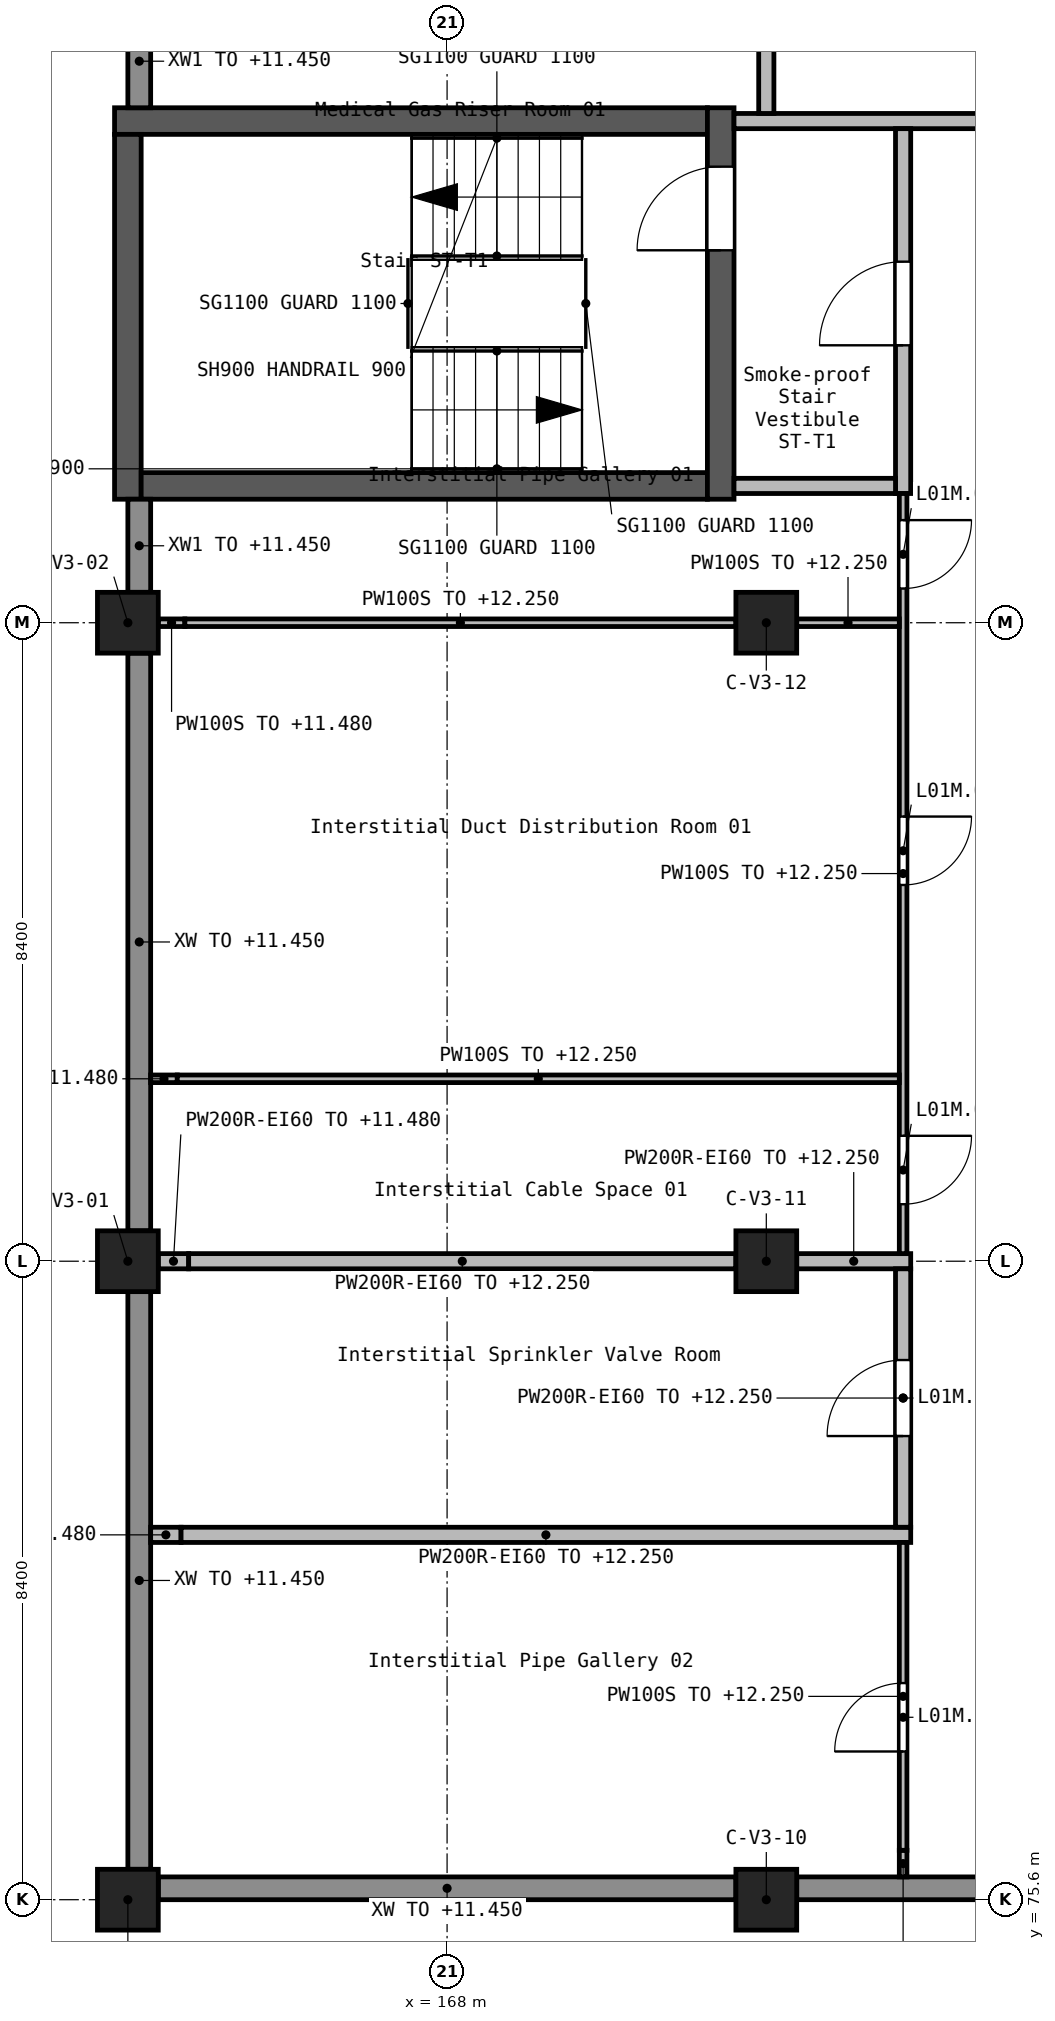
"""IFC4 building model, lengths in metres.
Left out: names, types, materials, properties, quantities, classifications, styles, units other than length and angle.
Written with IfcOpenShell. Run it as: python <this file> out.ifc"""

import sys

from ifc_helpers import new_model, si_unit, direction, frame, frame_2d, origin, origin_2d, place, context, subcontext, project, spatial, rectangle, extrude, element, fill, save


model = new_model("IFC4")
c1 = context("Model", 3, precision=1e-05, world=origin(), true_north=direction((0.0, 1.0)))
c2 = subcontext(c1, "Body", "Model", "MODEL_VIEW")
j1 = project(units=[si_unit("LENGTHUNIT", "METRE"), si_unit("PLANEANGLEUNIT", "RADIAN")], contexts=[c1])
p1 = place(None, origin())
s1 = spatial("IfcSite", under=j1, at=p1, CompositionType="ELEMENT")
p2 = place(p1, origin())
s2 = spatial("IfcBuilding", under=s1, at=p2, CompositionType="ELEMENT")
p3 = place(p2, frame((0.0, 0.0, 9.9)))
s3 = spatial("IfcBuildingStorey", under=s2, at=p3, CompositionType="ELEMENT", Elevation=9.9)
for number, where, z_axis, x_axis in (
    (1, (163.8, 75.6, 0.0), (0.0, 0.0, 1.0), (1.0, 0.0, 0.0)),
    (2, (163.8, 84.0, 0.0), (0.0, 0.0, 1.0), (1.0, 0.0, 0.0)),
    (3, (163.8, 92.4, 0.0), (0.0, 0.0, 1.0), (1.0, 0.0, 0.0)),
    (4, (172.2, 75.6, 0.0), (0.0, 0.0, 1.0), (1.0, 0.0, 0.0)),
    (5, (172.2, 84.0, 0.0), (0.0, 0.0, 1.0), (1.0, 0.0, 0.0)),
    (6, (172.2, 92.4, 0.0), (0.0, 0.0, 1.0), (1.0, 0.0, 0.0)),
):
    element("IfcColumn", number, at=place(p3, frame(where, z_axis=z_axis, x_axis=x_axis)), inside=s3, PredefinedType="COLUMN", context=c2, shape_type="SweptSolid", body=[
        extrude(rectangle(XDim=0.8, YDim=0.8, at=origin_2d()), origin(), (0.0, 0.0, 1.0), 2.7),
    ])
p4 = place(p3, frame((163.625, 99.0, 0.0), z_axis=(0.0, 0.0, 1.0), x_axis=(1.0, 0.0, 0.0)))
e7 = element("IfcWall", 7, at=p4, inside=s3, PredefinedType="SHEAR", context=c2, shape_type="SweptSolid", body=[
    extrude(rectangle(XDim=7.8, YDim=0.35, at=frame_2d((3.9, 0.0))), origin(), (0.0, 0.0, 1.0), 2.7),
])
p5 = place(p3, frame((163.8, 94.025, 0.0), z_axis=(0.0, 0.0, 1.0), x_axis=(0.0, 1.0, 0.0)))
e8 = element("IfcWall", 8, at=p5, inside=s3, PredefinedType="SHEAR", context=c2, shape_type="SweptSolid", body=[
    extrude(rectangle(XDim=4.8, YDim=0.35, at=frame_2d((2.4, 0.0))), origin(), (0.0, 0.0, 1.0), 2.7),
])
p6 = place(p3, frame((163.975, 94.2, 0.0), z_axis=(0.0, 0.0, 1.0), x_axis=(1.0, 0.0, 0.0)))
e9 = element("IfcWall", 9, at=p6, inside=s3, PredefinedType="SHEAR", context=c2, shape_type="SweptSolid", body=[
    extrude(rectangle(XDim=7.45, YDim=0.35, at=frame_2d((3.725, 0.0))), origin(), (0.0, 0.0, 1.0), 2.7),
])
p7 = place(p3, frame((171.6, 94.025, 0.0), z_axis=(0.0, 0.0, 1.0), x_axis=(0.0, 1.0, 0.0)))
e10 = element("IfcWall", 10, at=p7, inside=s3, PredefinedType="SHEAR", context=c2, shape_type="SweptSolid", body=[
    extrude(rectangle(XDim=5.15, YDim=0.35, at=frame_2d((2.575, 0.0))), origin(), (0.0, 0.0, 1.0), 2.7),
])
p8 = place(p7, frame((3.275, 0.0, 0.0)))
e11 = element("IfcOpeningElement", 11, at=p8, cuts=e10, PredefinedType="OPENING", context=c2, shape_type="SweptSolid", body=[
    extrude(rectangle(XDim=1.1, YDim=2.1, at=frame_2d((0.55, 1.05))), frame((0.0, 0.185, 0.0), z_axis=(0.0, -1.0, 0.0), x_axis=(1.0, 0.0, 0.0)), (0.0, 0.0, 1.0), 0.37),
])
for number, where, z_axis, x_axis in (
    (12, (163.95, 100.4, 0.0), (0.0, 0.0, 1.0), (0.0, -1.0, 0.0)),
    (13, (163.95, 94.025, 0.0), (0.0, 0.0, 1.0), (0.0, -1.0, 0.0)),
):
    element("IfcWall", number, at=place(p3, frame(where, z_axis=z_axis, x_axis=x_axis)), inside=s3, PredefinedType="STANDARD", context=c2, shape_type="SweptSolid", body=[
        extrude(rectangle(XDim=1.225, YDim=0.3, at=frame_2d((0.612, 0.0))), origin(), (0.0, 0.0, 1.0), 1.55),
    ])
for number, where, z_axis, x_axis in (
    (14, (163.95, 92.0, 0.0), (0.0, 0.0, 1.0), (0.0, -1.0, 0.0)),
    (15, (163.95, 83.6, 0.0), (0.0, 0.0, 1.0), (0.0, -1.0, 0.0)),
    (16, (164.2, 75.75, 0.0), (0.0, 0.0, 1.0), (1.0, 0.0, 0.0)),
):
    element("IfcWall", number, at=place(p3, frame(where, z_axis=z_axis, x_axis=x_axis)), inside=s3, PredefinedType="STANDARD", context=c2, shape_type="SweptSolid", body=[
        extrude(rectangle(XDim=7.6, YDim=0.3, at=frame_2d((3.8, 0.0))), origin(), (0.0, 0.0, 1.0), 1.55),
    ])
p9 = place(p3, frame((172.6, 75.75, 0.0), z_axis=(0.0, 0.0, 1.0), x_axis=(1.0, 0.0, 0.0)))
e17 = element("IfcWall", 17, at=p9, inside=s3, PredefinedType="STANDARD", context=c2, shape_type="SweptSolid", body=[
    extrude(rectangle(XDim=7.6, YDim=0.3, at=frame_2d((3.8, 0.0))), origin(), (0.0, 0.0, 1.0), 1.55),
])
p10 = place(p3, frame((180.7, 99.0, 0.0), z_axis=(0.0, 0.0, 1.0), x_axis=(-1.0, 0.0, 0.0)))
e18 = element("IfcWall", 18, at=p10, inside=s3, PredefinedType="SOLIDWALL", context=c2, shape_type="SweptSolid", body=[
    extrude(rectangle(XDim=8.925, YDim=0.2, at=frame_2d((4.462, 0.0))), origin(), (0.0, 0.0, 1.0), 2.35),
])
p11 = place(p10, frame((2.5, 0.0, 0.0)))
e19 = element("IfcOpeningElement", 19, at=p11, cuts=e18, PredefinedType="OPENING", context=c2, shape_type="SweptSolid", body=[
    extrude(rectangle(XDim=1.8, YDim=2.1, at=frame_2d((0.9, 1.05))), frame((0.0, 0.11, 0.0), z_axis=(0.0, -1.0, 0.0), x_axis=(1.0, 0.0, 0.0)), (0.0, 0.0, 1.0), 0.22),
])
p12 = place(p3, frame((164.1, 80.4, 0.0), z_axis=(0.0, 0.0, 1.0), x_axis=(1.0, 0.0, 0.0)))
e20 = element("IfcWall", 20, at=p12, inside=s3, PredefinedType="SOLIDWALL", context=c2, shape_type="SweptSolid", body=[
    extrude(rectangle(XDim=0.4, YDim=0.2, at=frame_2d((0.2, 0.0))), origin(), (0.0, 0.0, 1.0), 1.58),
])
p13 = place(p3, frame((164.5, 80.4, 0.0), z_axis=(0.0, 0.0, 1.0), x_axis=(1.0, 0.0, 0.0)))
e21 = element("IfcWall", 21, at=p13, inside=s3, PredefinedType="SOLIDWALL", context=c2, shape_type="SweptSolid", body=[
    extrude(rectangle(XDim=9.6, YDim=0.2, at=frame_2d((4.8, 0.0))), origin(), (0.0, 0.0, 1.0), 2.35),
])
p14 = place(p3, frame((164.2, 84.0, 0.0), z_axis=(0.0, 0.0, 1.0), x_axis=(1.0, 0.0, 0.0)))
e22 = element("IfcWall", 22, at=p14, inside=s3, PredefinedType="SOLIDWALL", context=c2, shape_type="SweptSolid", body=[
    extrude(rectangle(XDim=0.4, YDim=0.2, at=frame_2d((0.2, 0.0))), origin(), (0.0, 0.0, 1.0), 1.58),
])
p15 = place(p3, frame((164.6, 84.0, 0.0), z_axis=(0.0, 0.0, 1.0), x_axis=(1.0, 0.0, 0.0)))
e23 = element("IfcWall", 23, at=p15, inside=s3, PredefinedType="SOLIDWALL", context=c2, shape_type="SweptSolid", body=[
    extrude(rectangle(XDim=7.2, YDim=0.2, at=frame_2d((3.6, 0.0))), origin(), (0.0, 0.0, 1.0), 2.35),
])
p16 = place(p3, frame((172.6, 84.0, 0.0), z_axis=(0.0, 0.0, 1.0), x_axis=(1.0, 0.0, 0.0)))
e24 = element("IfcWall", 24, at=p16, inside=s3, PredefinedType="SOLIDWALL", context=c2, shape_type="SweptSolid", body=[
    extrude(rectangle(XDim=1.5, YDim=0.2, at=frame_2d((0.75, 0.0))), origin(), (0.0, 0.0, 1.0), 2.35),
])
p17 = place(p3, frame((172.2, 100.4, 0.0), z_axis=(0.0, 0.0, 1.0), x_axis=(0.0, -1.0, 0.0)))
e25 = element("IfcWall", 25, at=p17, inside=s3, PredefinedType="SOLIDWALL", context=c2, shape_type="SweptSolid", body=[
    extrude(rectangle(XDim=1.3, YDim=0.2, at=frame_2d((0.65, 0.0))), origin(), (0.0, 0.0, 1.0), 2.35),
])
p18 = place(p3, frame((174.0, 94.1, 0.0), z_axis=(0.0, 0.0, 1.0), x_axis=(0.0, 1.0, 0.0)))
e26 = element("IfcWall", 26, at=p18, inside=s3, PredefinedType="SOLIDWALL", context=c2, shape_type="SweptSolid", body=[
    extrude(rectangle(XDim=4.8, YDim=0.2, at=frame_2d((2.4, 0.0))), origin(), (0.0, 0.0, 1.0), 2.35),
])
p19 = place(p18, frame((1.95, 0.0, 0.0)))
e27 = element("IfcOpeningElement", 27, at=p19, cuts=e26, PredefinedType="OPENING", context=c2, shape_type="SweptSolid", body=[
    extrude(rectangle(XDim=1.1, YDim=2.1, at=frame_2d((0.55, 1.05))), frame((0.0, 0.11, 0.0), z_axis=(0.0, -1.0, 0.0), x_axis=(1.0, 0.0, 0.0)), (0.0, 0.0, 1.0), 0.22),
])
p20 = place(p3, frame((174.0, 80.5, 0.0), z_axis=(0.0, 0.0, 1.0), x_axis=(0.0, 1.0, 0.0)))
e28 = element("IfcWall", 28, at=p20, inside=s3, PredefinedType="SOLIDWALL", context=c2, shape_type="SweptSolid", body=[
    extrude(rectangle(XDim=3.4, YDim=0.2, at=frame_2d((1.7, 0.0))), origin(), (0.0, 0.0, 1.0), 2.35),
])
p21 = place(p20, frame((1.2, 0.0, 0.0)))
e29 = element("IfcOpeningElement", 29, at=p21, cuts=e28, PredefinedType="OPENING", context=c2, shape_type="SweptSolid", body=[
    extrude(rectangle(XDim=1.0, YDim=2.1, at=frame_2d((0.5, 1.05))), frame((0.0, 0.11, 0.0), z_axis=(0.0, -1.0, 0.0), x_axis=(1.0, 0.0, 0.0)), (0.0, 0.0, 1.0), 0.22),
])
p22 = place(p3, frame((171.775, 94.2, 0.0), z_axis=(0.0, 0.0, 1.0), x_axis=(1.0, 0.0, 0.0)))
e30 = element("IfcWall", 30, at=p22, inside=s3, PredefinedType="SOLIDWALL", context=c2, shape_type="SweptSolid", body=[
    extrude(rectangle(XDim=2.125, YDim=0.2, at=frame_2d((1.062, 0.0))), origin(), (0.0, 0.0, 1.0), 2.35),
])
p23 = place(p3, frame((174.0, 94.1, 0.0), z_axis=(0.0, 0.0, 1.0), x_axis=(0.0, -1.0, 0.0)))
e31 = element("IfcWall", 31, at=p23, inside=s3, PredefinedType="PARTITIONING", context=c2, shape_type="SweptSolid", body=[
    extrude(rectangle(XDim=10.0, YDim=0.1, at=frame_2d((5.0, 0.0))), origin(), (0.0, 0.0, 1.0), 2.35),
])
p24 = place(p23, frame((0.35, 0.0, 0.0)))
e32 = element("IfcOpeningElement", 32, at=p24, cuts=e31, PredefinedType="OPENING", context=c2, shape_type="SweptSolid", body=[
    extrude(rectangle(XDim=0.9, YDim=2.1, at=frame_2d((0.45, 1.05))), frame((0.0, 0.06, 0.0), z_axis=(0.0, -1.0, 0.0), x_axis=(1.0, 0.0, 0.0)), (0.0, 0.0, 1.0), 0.12),
])
p25 = place(p23, frame((4.25, 0.0, 0.0)))
e33 = element("IfcOpeningElement", 33, at=p25, cuts=e31, PredefinedType="OPENING", context=c2, shape_type="SweptSolid", body=[
    extrude(rectangle(XDim=0.9, YDim=2.1, at=frame_2d((0.45, 1.05))), frame((0.0, 0.06, 0.0), z_axis=(0.0, -1.0, 0.0), x_axis=(1.0, 0.0, 0.0)), (0.0, 0.0, 1.0), 0.12),
])
p26 = place(p23, frame((8.45, 0.0, 0.0)))
e34 = element("IfcOpeningElement", 34, at=p26, cuts=e31, PredefinedType="OPENING", context=c2, shape_type="SweptSolid", body=[
    extrude(rectangle(XDim=0.9, YDim=2.1, at=frame_2d((0.45, 1.05))), frame((0.0, 0.06, 0.0), z_axis=(0.0, -1.0, 0.0), x_axis=(1.0, 0.0, 0.0)), (0.0, 0.0, 1.0), 0.12),
])
p27 = place(p3, frame((164.1, 86.4, 0.0), z_axis=(0.0, 0.0, 1.0), x_axis=(1.0, 0.0, 0.0)))
e35 = element("IfcWall", 35, at=p27, inside=s3, PredefinedType="PARTITIONING", context=c2, shape_type="SweptSolid", body=[
    extrude(rectangle(XDim=0.35, YDim=0.1, at=frame_2d((0.175, 0.0))), origin(), (0.0, 0.0, 1.0), 1.58),
])
p28 = place(p3, frame((164.45, 86.4, 0.0), z_axis=(0.0, 0.0, 1.0), x_axis=(1.0, 0.0, 0.0)))
e36 = element("IfcWall", 36, at=p28, inside=s3, PredefinedType="PARTITIONING", context=c2, shape_type="SweptSolid", body=[
    extrude(rectangle(XDim=9.5, YDim=0.1, at=frame_2d((4.75, 0.0))), origin(), (0.0, 0.0, 1.0), 2.35),
])
p29 = place(p3, frame((164.2, 92.4, 0.0), z_axis=(0.0, 0.0, 1.0), x_axis=(1.0, 0.0, 0.0)))
e37 = element("IfcWall", 37, at=p29, inside=s3, PredefinedType="PARTITIONING", context=c2, shape_type="SweptSolid", body=[
    extrude(rectangle(XDim=0.35, YDim=0.1, at=frame_2d((0.175, 0.0))), origin(), (0.0, 0.0, 1.0), 1.58),
])
p30 = place(p3, frame((164.55, 92.4, 0.0), z_axis=(0.0, 0.0, 1.0), x_axis=(1.0, 0.0, 0.0)))
e38 = element("IfcWall", 38, at=p30, inside=s3, PredefinedType="PARTITIONING", context=c2, shape_type="SweptSolid", body=[
    extrude(rectangle(XDim=7.25, YDim=0.1, at=frame_2d((3.625, 0.0))), origin(), (0.0, 0.0, 1.0), 2.35),
])
p31 = place(p3, frame((172.6, 92.4, 0.0), z_axis=(0.0, 0.0, 1.0), x_axis=(1.0, 0.0, 0.0)))
e39 = element("IfcWall", 39, at=p31, inside=s3, PredefinedType="PARTITIONING", context=c2, shape_type="SweptSolid", body=[
    extrude(rectangle(XDim=1.35, YDim=0.1, at=frame_2d((0.675, 0.0))), origin(), (0.0, 0.0, 1.0), 2.35),
])
p32 = place(p3, frame((174.0, 75.9, 0.0), z_axis=(0.0, 0.0, 1.0), x_axis=(0.0, 1.0, 0.0)))
e40 = element("IfcWall", 40, at=p32, inside=s3, PredefinedType="PARTITIONING", context=c2, shape_type="SweptSolid", body=[
    extrude(rectangle(XDim=0.35, YDim=0.1, at=frame_2d((0.175, 0.0))), origin(), (0.0, 0.0, 1.0), 1.58),
])
p33 = place(p3, frame((174.0, 76.25, 0.0), z_axis=(0.0, 0.0, 1.0), x_axis=(0.0, 1.0, 0.0)))
e41 = element("IfcWall", 41, at=p33, inside=s3, PredefinedType="PARTITIONING", context=c2, shape_type="SweptSolid", body=[
    extrude(rectangle(XDim=4.05, YDim=0.1, at=frame_2d((2.025, 0.0))), origin(), (0.0, 0.0, 1.0), 2.35),
])
p34 = place(p33, frame((1.3, 0.0, 0.0)))
e42 = element("IfcOpeningElement", 42, at=p34, cuts=e41, PredefinedType="OPENING", context=c2, shape_type="SweptSolid", body=[
    extrude(rectangle(XDim=0.9, YDim=2.1, at=frame_2d((0.45, 1.05))), frame((0.0, 0.06, 0.0), z_axis=(0.0, -1.0, 0.0), x_axis=(1.0, 0.0, 0.0)), (0.0, 0.0, 1.0), 0.12),
])
p35 = place(p8, origin())
e43 = element("IfcDoor", 43, at=p35, inside=s3, OperationType="SINGLE_SWING_RIGHT", PredefinedType="DOOR", context=c2, shape_type="SweptSolid", body=[
    extrude(rectangle(XDim=1.1, YDim=2.1, at=frame_2d((0.55, 1.05))), frame((0.0, 0.025, 0.0), z_axis=(0.0, -1.0, 0.0), x_axis=(1.0, 0.0, 0.0)), (0.0, 0.0, 1.0), 0.05),
])
fill(e11, e43)
p36 = place(p19, origin())
e44 = element("IfcDoor", 44, at=p36, inside=s3, OperationType="SINGLE_SWING_RIGHT", PredefinedType="DOOR", context=c2, shape_type="SweptSolid", body=[
    extrude(rectangle(XDim=1.1, YDim=2.1, at=frame_2d((0.55, 1.05))), frame((0.0, 0.025, 0.0), z_axis=(0.0, -1.0, 0.0), x_axis=(1.0, 0.0, 0.0)), (0.0, 0.0, 1.0), 0.05),
])
fill(e27, e44)
p37 = place(p24, frame((0.9, 0.0, 0.0), z_axis=(0.0, 0.0, 1.0), x_axis=(-1.0, 0.0, 0.0)))
e45 = element("IfcDoor", 45, at=p37, inside=s3, OperationType="SINGLE_SWING_RIGHT", PredefinedType="DOOR", context=c2, shape_type="SweptSolid", body=[
    extrude(rectangle(XDim=0.9, YDim=2.1, at=frame_2d((0.45, 1.05))), frame((0.0, 0.025, 0.0), z_axis=(0.0, -1.0, 0.0), x_axis=(1.0, 0.0, 0.0)), (0.0, 0.0, 1.0), 0.05),
])
fill(e32, e45)
p38 = place(p25, frame((0.9, 0.0, 0.0), z_axis=(0.0, 0.0, 1.0), x_axis=(-1.0, 0.0, 0.0)))
e46 = element("IfcDoor", 46, at=p38, inside=s3, OperationType="SINGLE_SWING_RIGHT", PredefinedType="DOOR", context=c2, shape_type="SweptSolid", body=[
    extrude(rectangle(XDim=0.9, YDim=2.1, at=frame_2d((0.45, 1.05))), frame((0.0, 0.025, 0.0), z_axis=(0.0, -1.0, 0.0), x_axis=(1.0, 0.0, 0.0)), (0.0, 0.0, 1.0), 0.05),
])
fill(e33, e46)
p39 = place(p26, frame((0.9, 0.0, 0.0), z_axis=(0.0, 0.0, 1.0), x_axis=(-1.0, 0.0, 0.0)))
e47 = element("IfcDoor", 47, at=p39, inside=s3, OperationType="SINGLE_SWING_LEFT", PredefinedType="DOOR", context=c2, shape_type="SweptSolid", body=[
    extrude(rectangle(XDim=0.9, YDim=2.1, at=frame_2d((0.45, 1.05))), frame((0.0, 0.025, 0.0), z_axis=(0.0, -1.0, 0.0), x_axis=(1.0, 0.0, 0.0)), (0.0, 0.0, 1.0), 0.05),
])
fill(e34, e47)
p40 = place(p21, origin())
e48 = element("IfcDoor", 48, at=p40, inside=s3, OperationType="SINGLE_SWING_LEFT", PredefinedType="DOOR", context=c2, shape_type="SweptSolid", body=[
    extrude(rectangle(XDim=1.0, YDim=2.1, at=frame_2d((0.5, 1.05))), frame((0.0, 0.025, 0.0), z_axis=(0.0, -1.0, 0.0), x_axis=(1.0, 0.0, 0.0)), (0.0, 0.0, 1.0), 0.05),
])
fill(e29, e48)
p41 = place(p34, origin())
e49 = element("IfcDoor", 49, at=p41, inside=s3, OperationType="SINGLE_SWING_LEFT", PredefinedType="DOOR", context=c2, shape_type="SweptSolid", body=[
    extrude(rectangle(XDim=0.9, YDim=2.1, at=frame_2d((0.45, 1.05))), frame((0.0, 0.025, 0.0), z_axis=(0.0, -1.0, 0.0), x_axis=(1.0, 0.0, 0.0)), (0.0, 0.0, 1.0), 0.05),
])
fill(e42, e49)
save(model, sys.argv[1])
